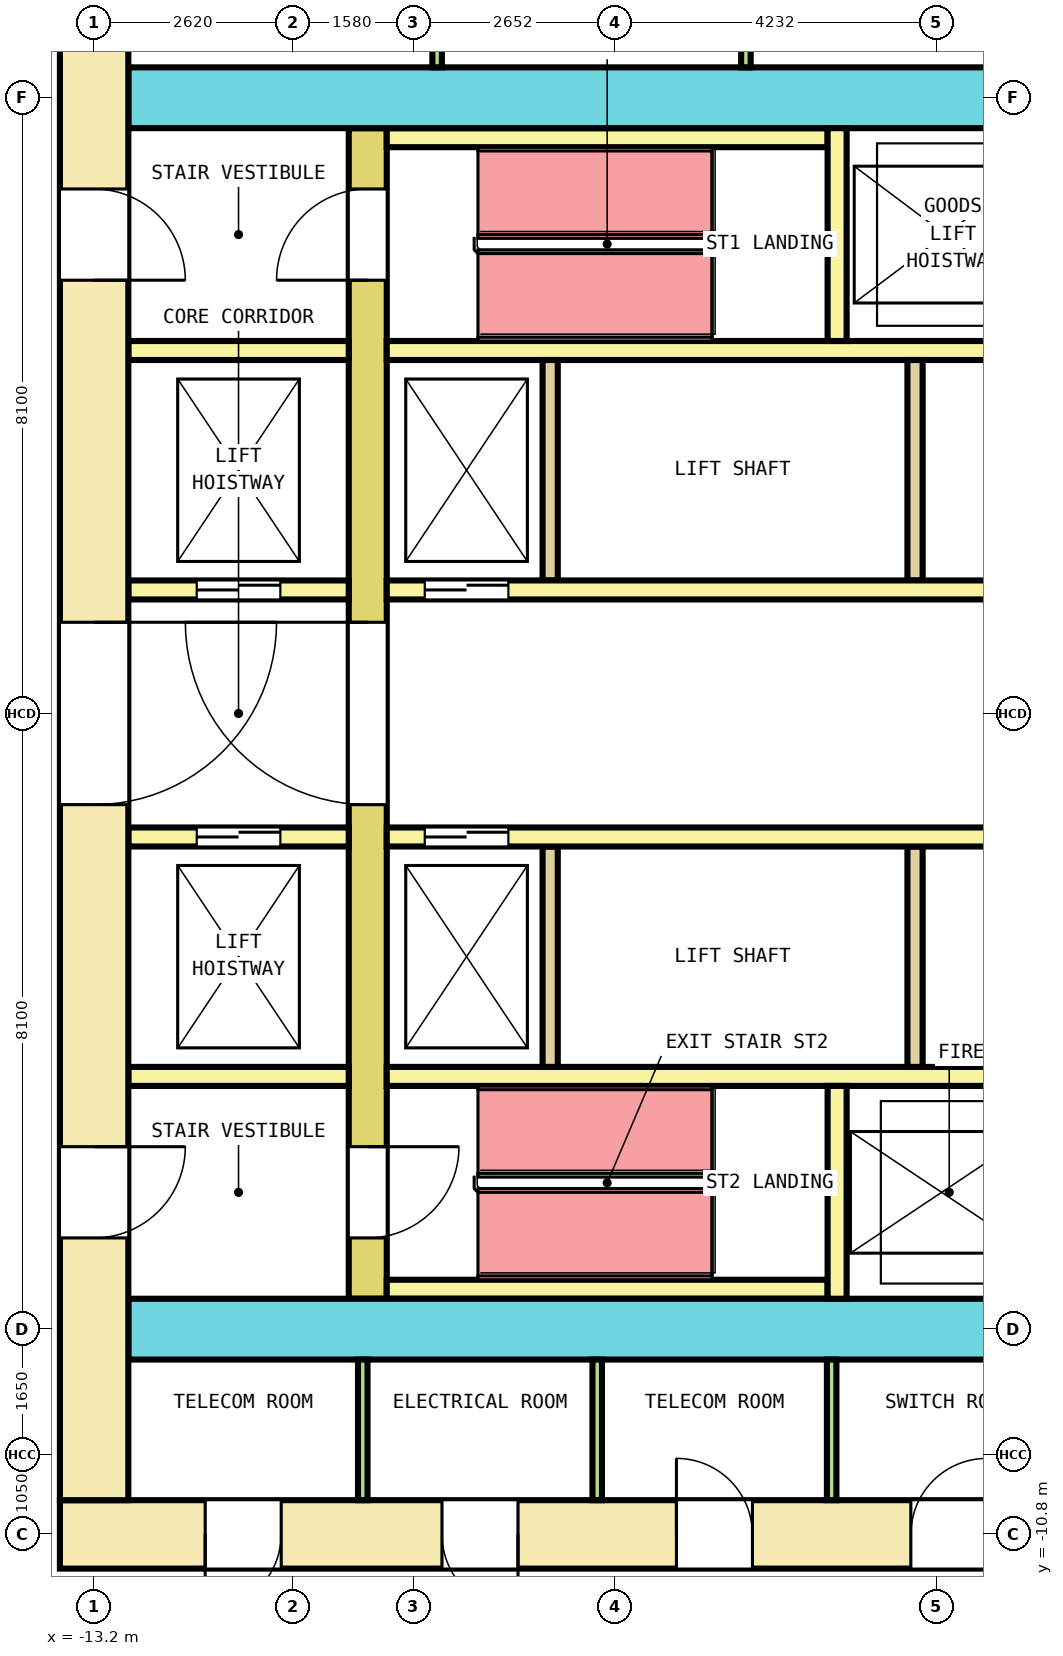
"""IFC4 building model, lengths in metres.
Left out: names, types, materials, properties, quantities, classifications, styles, units other than length and angle.
Written with IfcOpenShell. Run it as: python <this file> out.ifc"""

import sys

from ifc_helpers import new_model, si_unit, direction, frame, frame_2d, origin, place, context, subcontext, project, spatial, rectangle, extrude, element, fill, save


model = new_model("IFC4")
c1 = context("Model", 3, precision=1e-05, world=origin(), true_north=direction((0.0, 1.0)))
c2 = subcontext(c1, "Body", "Model", "MODEL_VIEW")
j1 = project(units=[si_unit("LENGTHUNIT", "METRE"), si_unit("PLANEANGLEUNIT", "RADIAN")], contexts=[c1])
p1 = place(None, origin())
s1 = spatial("IfcSite", under=j1, at=p1, CompositionType="ELEMENT")
p2 = place(p1, origin())
s2 = spatial("IfcBuilding", under=s1, at=p2, CompositionType="ELEMENT")
p3 = place(p2, frame((0.0, 0.0, 41.0)))
s3 = spatial("IfcBuildingStorey", under=s2, at=p3, CompositionType="ELEMENT", Elevation=41.0)
p4 = place(p3, frame((-13.65, -10.8, 0.0), z_axis=(0.0, 0.0, 1.0), x_axis=(1.0, 0.0, 0.0)))
e1 = element("IfcWall", 1, at=p4, inside=s3, PredefinedType="SHEAR", context=c2, shape_type="SweptSolid", body=[
    extrude(rectangle(XDim=27.3, YDim=0.9, at=frame_2d((13.65, 0.0))), origin(), (0.0, 0.0, 1.0), 4.1),
])
p5 = place(p4, frame((1.911, 0.0, 0.0)))
e2 = element("IfcOpeningElement", 2, at=p5, cuts=e1, PredefinedType="OPENING", context=c2, shape_type="SweptSolid", body=[
    extrude(rectangle(XDim=1.0, YDim=2.1, at=frame_2d((0.5, 1.05))), frame((0.0, 0.46, 0.0), z_axis=(0.0, -1.0, 0.0), x_axis=(1.0, 0.0, 0.0)), (0.0, 0.0, 1.0), 0.92),
])
p6 = place(p4, frame((5.027, 0.0, 0.0)))
e3 = element("IfcOpeningElement", 3, at=p6, cuts=e1, PredefinedType="OPENING", context=c2, shape_type="SweptSolid", body=[
    extrude(rectangle(XDim=1.0, YDim=2.1, at=frame_2d((0.5, 1.05))), frame((0.0, 0.46, 0.0), z_axis=(0.0, -1.0, 0.0), x_axis=(1.0, 0.0, 0.0)), (0.0, 0.0, 1.0), 0.92),
])
p7 = place(p4, frame((8.111, 0.0, 0.0)))
e4 = element("IfcOpeningElement", 4, at=p7, cuts=e1, PredefinedType="OPENING", context=c2, shape_type="SweptSolid", body=[
    extrude(rectangle(XDim=1.0, YDim=2.1, at=frame_2d((0.5, 1.05))), frame((0.0, 0.46, 0.0), z_axis=(0.0, -1.0, 0.0), x_axis=(1.0, 0.0, 0.0)), (0.0, 0.0, 1.0), 0.92),
])
p8 = place(p4, frame((11.195, 0.0, 0.0)))
e5 = element("IfcOpeningElement", 5, at=p8, cuts=e1, PredefinedType="OPENING", context=c2, shape_type="SweptSolid", body=[
    extrude(rectangle(XDim=1.0, YDim=2.1, at=frame_2d((0.5, 1.05))), frame((0.0, 0.46, 0.0), z_axis=(0.0, -1.0, 0.0), x_axis=(1.0, 0.0, 0.0)), (0.0, 0.0, 1.0), 0.92),
])
p9 = place(p4, frame((21.913, 0.0, 0.0)))
e6 = element("IfcOpeningElement", 6, at=p9, cuts=e1, PredefinedType="OPENING", context=c2, shape_type="SweptSolid", body=[
    extrude(rectangle(XDim=1.0, YDim=2.1, at=frame_2d((0.5, 1.05))), frame((0.0, 0.46, 0.0), z_axis=(0.0, -1.0, 0.0), x_axis=(1.0, 0.0, 0.0)), (0.0, 0.0, 1.0), 0.92),
])
p10 = place(p4, frame((15.2, 0.0, 0.0)))
e7 = element("IfcOpeningElement", 7, at=p10, cuts=e1, PredefinedType="OPENING", context=c2, shape_type="SweptSolid", body=[
    extrude(rectangle(XDim=1.2, YDim=2.1, at=frame_2d((0.6, 1.05))), frame((0.0, 0.46, 0.0), z_axis=(0.0, -1.0, 0.0), x_axis=(1.0, 0.0, 0.0)), (0.0, 0.0, 1.0), 0.92),
])
p11 = place(p3, frame((-13.2, -10.35, 0.0), z_axis=(0.0, 0.0, 1.0), x_axis=(0.0, 1.0, 0.0)))
e8 = element("IfcWall", 8, at=p11, inside=s3, PredefinedType="SHEAR", context=c2, shape_type="SweptSolid", body=[
    extrude(rectangle(XDim=20.7, YDim=0.9, at=frame_2d((10.35, 0.0))), origin(), (0.0, 0.0, 1.0), 4.1),
])
p12 = place(p11, frame((9.15, 0.0, 0.0)))
e9 = element("IfcOpeningElement", 9, at=p12, cuts=e8, PredefinedType="OPENING", context=c2, shape_type="SweptSolid", body=[
    extrude(rectangle(XDim=2.4, YDim=2.1, at=frame_2d((1.2, 1.05))), frame((0.0, 0.46, 0.0), z_axis=(0.0, -1.0, 0.0), x_axis=(1.0, 0.0, 0.0)), (0.0, 0.0, 1.0), 0.92),
])
p13 = place(p11, frame((16.05, 0.0, 0.0)))
e10 = element("IfcOpeningElement", 10, at=p13, cuts=e8, PredefinedType="OPENING", context=c2, shape_type="SweptSolid", body=[
    extrude(rectangle(XDim=1.2, YDim=2.1, at=frame_2d((0.6, 1.05))), frame((0.0, 0.46, 0.0), z_axis=(0.0, -1.0, 0.0), x_axis=(1.0, 0.0, 0.0)), (0.0, 0.0, 1.0), 0.92),
])
p14 = place(p11, frame((3.45, 0.0, 0.0)))
e11 = element("IfcOpeningElement", 11, at=p14, cuts=e8, PredefinedType="OPENING", context=c2, shape_type="SweptSolid", body=[
    extrude(rectangle(XDim=1.2, YDim=2.1, at=frame_2d((0.6, 1.05))), frame((0.0, 0.46, 0.0), z_axis=(0.0, -1.0, 0.0), x_axis=(1.0, 0.0, 0.0)), (0.0, 0.0, 1.0), 0.92),
])
p15 = place(p3, frame((-12.75, 8.1, 0.0), z_axis=(0.0, 0.0, 1.0), x_axis=(1.0, 0.0, 0.0)))
e12 = element("IfcWall", 12, at=p15, inside=s3, PredefinedType="SHEAR", context=c2, shape_type="SweptSolid", body=[
    extrude(rectangle(XDim=25.5, YDim=0.8, at=frame_2d((12.75, 0.0))), origin(), (0.0, 0.0, 1.0), 4.1),
])
p16 = place(p15, frame((13.675, 0.0, 0.0)))
e13 = element("IfcOpeningElement", 13, at=p16, cuts=e12, PredefinedType="OPENING", context=c2, shape_type="SweptSolid", body=[
    extrude(rectangle(XDim=1.4, YDim=2.1, at=frame_2d((0.7, 1.05))), frame((0.0, 0.41, 0.0), z_axis=(0.0, -1.0, 0.0), x_axis=(1.0, 0.0, 0.0)), (0.0, 0.0, 1.0), 0.82),
])
p17 = place(p3, frame((-12.75, -8.1, 0.0), z_axis=(0.0, 0.0, 1.0), x_axis=(1.0, 0.0, 0.0)))
e14 = element("IfcWall", 14, at=p17, inside=s3, PredefinedType="SHEAR", context=c2, shape_type="SweptSolid", body=[
    extrude(rectangle(XDim=25.5, YDim=0.8, at=frame_2d((12.75, 0.0))), origin(), (0.0, 0.0, 1.0), 4.1),
])
p18 = place(p17, frame((14.3, 0.0, 0.0)))
e15 = element("IfcOpeningElement", 15, at=p18, cuts=e14, PredefinedType="OPENING", context=c2, shape_type="SweptSolid", body=[
    extrude(rectangle(XDim=1.2, YDim=2.1, at=frame_2d((0.6, 1.05))), frame((0.0, 0.41, 0.0), z_axis=(0.0, -1.0, 0.0), x_axis=(1.0, 0.0, 0.0)), (0.0, 0.0, 1.0), 0.82),
])
p19 = place(p3, frame((-9.6, -7.7, 0.0), z_axis=(0.0, 0.0, 1.0), x_axis=(0.0, 1.0, 0.0)))
e16 = element("IfcWall", 16, at=p19, inside=s3, PredefinedType="SHEAR", context=c2, shape_type="SweptSolid", body=[
    extrude(rectangle(XDim=15.4, YDim=0.5, at=frame_2d((7.7, 0.0))), origin(), (0.0, 0.0, 1.0), 4.1),
])
p20 = place(p19, frame((6.5, 0.0, 0.0)))
e17 = element("IfcOpeningElement", 17, at=p20, cuts=e16, PredefinedType="OPENING", context=c2, shape_type="SweptSolid", body=[
    extrude(rectangle(XDim=2.4, YDim=2.1, at=frame_2d((1.2, 1.05))), frame((0.0, 0.26, 0.0), z_axis=(0.0, -1.0, 0.0), x_axis=(1.0, 0.0, 0.0)), (0.0, 0.0, 1.0), 0.52),
])
p21 = place(p19, frame((13.4, 0.0, 0.0)))
e18 = element("IfcOpeningElement", 18, at=p21, cuts=e16, PredefinedType="OPENING", context=c2, shape_type="SweptSolid", body=[
    extrude(rectangle(XDim=1.2, YDim=2.1, at=frame_2d((0.6, 1.05))), frame((0.0, 0.26, 0.0), z_axis=(0.0, -1.0, 0.0), x_axis=(1.0, 0.0, 0.0)), (0.0, 0.0, 1.0), 0.52),
])
p22 = place(p19, frame((0.8, 0.0, 0.0)))
e19 = element("IfcOpeningElement", 19, at=p22, cuts=e16, PredefinedType="OPENING", context=c2, shape_type="SweptSolid", body=[
    extrude(rectangle(XDim=1.2, YDim=2.1, at=frame_2d((0.6, 1.05))), frame((0.0, 0.26, 0.0), z_axis=(0.0, -1.0, 0.0), x_axis=(1.0, 0.0, 0.0)), (0.0, 0.0, 1.0), 0.52),
])
p23 = place(p3, frame((-12.75, 1.625, 0.0), z_axis=(0.0, 0.0, 1.0), x_axis=(1.0, 0.0, 0.0)))
e20 = element("IfcWall", 20, at=p23, inside=s3, PredefinedType="SOLIDWALL", context=c2, shape_type="SweptSolid", body=[
    extrude(rectangle(XDim=2.9, YDim=0.25, at=frame_2d((1.45, 0.0))), origin(), (0.0, 0.0, 1.0), 4.1),
])
p24 = place(p23, frame((0.9, 0.0, 0.0)))
e21 = element("IfcOpeningElement", 21, at=p24, cuts=e20, PredefinedType="OPENING", context=c2, shape_type="SweptSolid", body=[
    extrude(rectangle(XDim=1.1, YDim=2.1, at=frame_2d((0.55, 1.05))), frame((0.0, 0.135, 0.0), z_axis=(0.0, -1.0, 0.0), x_axis=(1.0, 0.0, 0.0)), (0.0, 0.0, 1.0), 0.27),
])
p25 = place(p3, frame((-9.35, 1.625, 0.0), z_axis=(0.0, 0.0, 1.0), x_axis=(1.0, 0.0, 0.0)))
e22 = element("IfcWall", 22, at=p25, inside=s3, PredefinedType="SOLIDWALL", context=c2, shape_type="SweptSolid", body=[
    extrude(rectangle(XDim=18.7, YDim=0.25, at=frame_2d((9.35, 0.0))), origin(), (0.0, 0.0, 1.0), 4.1),
])
p26 = place(p25, frame((0.5, 0.0, 0.0)))
e23 = element("IfcOpeningElement", 23, at=p26, cuts=e22, PredefinedType="OPENING", context=c2, shape_type="SweptSolid", body=[
    extrude(rectangle(XDim=1.1, YDim=2.1, at=frame_2d((0.55, 1.05))), frame((0.0, 0.135, 0.0), z_axis=(0.0, -1.0, 0.0), x_axis=(1.0, 0.0, 0.0)), (0.0, 0.0, 1.0), 0.27),
])
p27 = place(p25, frame((17.1, 0.0, 0.0)))
e24 = element("IfcOpeningElement", 24, at=p27, cuts=e22, PredefinedType="OPENING", context=c2, shape_type="SweptSolid", body=[
    extrude(rectangle(XDim=1.1, YDim=2.1, at=frame_2d((0.55, 1.05))), frame((0.0, 0.135, 0.0), z_axis=(0.0, -1.0, 0.0), x_axis=(1.0, 0.0, 0.0)), (0.0, 0.0, 1.0), 0.27),
])
p28 = place(p3, frame((-12.75, 4.775, 0.0), z_axis=(0.0, 0.0, 1.0), x_axis=(1.0, 0.0, 0.0)))
e25 = element("IfcWall", 25, at=p28, inside=s3, PredefinedType="SOLIDWALL", context=c2, shape_type="SweptSolid", body=[
    extrude(rectangle(XDim=2.9, YDim=0.25, at=frame_2d((1.45, 0.0))), origin(), (0.0, 0.0, 1.0), 4.1),
])
p29 = place(p3, frame((-9.35, 4.775, 0.0), z_axis=(0.0, 0.0, 1.0), x_axis=(1.0, 0.0, 0.0)))
e26 = element("IfcWall", 26, at=p29, inside=s3, PredefinedType="SOLIDWALL", context=c2, shape_type="SweptSolid", body=[
    extrude(rectangle(XDim=18.7, YDim=0.25, at=frame_2d((9.35, 0.0))), origin(), (0.0, 0.0, 1.0), 4.1),
])
for number, where, z_axis, x_axis in (
    (27, (-7.2, 1.75, 0.0), (0.0, 0.0, 1.0), (0.0, 1.0, 0.0)),
    (28, (-2.4, 1.75, 0.0), (0.0, 0.0, 1.0), (0.0, 1.0, 0.0)),
):
    element("IfcWall", number, at=place(p3, frame(where, z_axis=z_axis, x_axis=x_axis)), inside=s3, PredefinedType="SOLIDWALL", context=c2, shape_type="SweptSolid", body=[
        extrude(rectangle(XDim=2.9, YDim=0.2, at=frame_2d((1.45, 0.0))), origin(), (0.0, 0.0, 1.0), 4.1),
    ])
p30 = place(p3, frame((-12.75, -1.625, 0.0), z_axis=(0.0, 0.0, 1.0), x_axis=(1.0, 0.0, 0.0)))
e29 = element("IfcWall", 29, at=p30, inside=s3, PredefinedType="SOLIDWALL", context=c2, shape_type="SweptSolid", body=[
    extrude(rectangle(XDim=2.9, YDim=0.25, at=frame_2d((1.45, 0.0))), origin(), (0.0, 0.0, 1.0), 4.1),
])
p31 = place(p30, frame((0.9, 0.0, 0.0)))
e30 = element("IfcOpeningElement", 30, at=p31, cuts=e29, PredefinedType="OPENING", context=c2, shape_type="SweptSolid", body=[
    extrude(rectangle(XDim=1.1, YDim=2.1, at=frame_2d((0.55, 1.05))), frame((0.0, 0.135, 0.0), z_axis=(0.0, -1.0, 0.0), x_axis=(1.0, 0.0, 0.0)), (0.0, 0.0, 1.0), 0.27),
])
p32 = place(p3, frame((-9.35, -1.625, 0.0), z_axis=(0.0, 0.0, 1.0), x_axis=(1.0, 0.0, 0.0)))
e31 = element("IfcWall", 31, at=p32, inside=s3, PredefinedType="SOLIDWALL", context=c2, shape_type="SweptSolid", body=[
    extrude(rectangle(XDim=18.7, YDim=0.25, at=frame_2d((9.35, 0.0))), origin(), (0.0, 0.0, 1.0), 4.1),
])
p33 = place(p32, frame((0.5, 0.0, 0.0)))
e32 = element("IfcOpeningElement", 32, at=p33, cuts=e31, PredefinedType="OPENING", context=c2, shape_type="SweptSolid", body=[
    extrude(rectangle(XDim=1.1, YDim=2.1, at=frame_2d((0.55, 1.05))), frame((0.0, 0.135, 0.0), z_axis=(0.0, -1.0, 0.0), x_axis=(1.0, 0.0, 0.0)), (0.0, 0.0, 1.0), 0.27),
])
p34 = place(p32, frame((17.1, 0.0, 0.0)))
e33 = element("IfcOpeningElement", 33, at=p34, cuts=e31, PredefinedType="OPENING", context=c2, shape_type="SweptSolid", body=[
    extrude(rectangle(XDim=1.1, YDim=2.1, at=frame_2d((0.55, 1.05))), frame((0.0, 0.135, 0.0), z_axis=(0.0, -1.0, 0.0), x_axis=(1.0, 0.0, 0.0)), (0.0, 0.0, 1.0), 0.27),
])
p35 = place(p3, frame((-12.75, -4.775, 0.0), z_axis=(0.0, 0.0, 1.0), x_axis=(1.0, 0.0, 0.0)))
e34 = element("IfcWall", 34, at=p35, inside=s3, PredefinedType="SOLIDWALL", context=c2, shape_type="SweptSolid", body=[
    extrude(rectangle(XDim=2.9, YDim=0.25, at=frame_2d((1.45, 0.0))), origin(), (0.0, 0.0, 1.0), 4.1),
])
p36 = place(p3, frame((-9.35, -4.775, 0.0), z_axis=(0.0, 0.0, 1.0), x_axis=(1.0, 0.0, 0.0)))
e35 = element("IfcWall", 35, at=p36, inside=s3, PredefinedType="SOLIDWALL", context=c2, shape_type="SweptSolid", body=[
    extrude(rectangle(XDim=18.7, YDim=0.25, at=frame_2d((9.35, 0.0))), origin(), (0.0, 0.0, 1.0), 4.1),
])
for number, where, z_axis, x_axis in (
    (36, (-7.2, -4.65, 0.0), (0.0, 0.0, 1.0), (0.0, 1.0, 0.0)),
    (37, (-2.4, -4.65, 0.0), (0.0, 0.0, 1.0), (0.0, 1.0, 0.0)),
):
    element("IfcWall", number, at=place(p3, frame(where, z_axis=z_axis, x_axis=x_axis)), inside=s3, PredefinedType="SOLIDWALL", context=c2, shape_type="SweptSolid", body=[
        extrude(rectangle(XDim=2.9, YDim=0.2, at=frame_2d((1.45, 0.0))), origin(), (0.0, 0.0, 1.0), 4.1),
    ])
p37 = place(p3, frame((-9.35, 7.575, 0.0), z_axis=(0.0, 0.0, 1.0), x_axis=(1.0, 0.0, 0.0)))
e38 = element("IfcWall", 38, at=p37, inside=s3, PredefinedType="SOLIDWALL", context=c2, shape_type="SweptSolid", body=[
    extrude(rectangle(XDim=5.8, YDim=0.25, at=frame_2d((2.9, 0.0))), origin(), (0.0, 0.0, 1.0), 4.1),
])
p38 = place(p3, frame((-3.425, 4.9, 0.0), z_axis=(0.0, 0.0, 1.0), x_axis=(0.0, 1.0, 0.0)))
e39 = element("IfcWall", 39, at=p38, inside=s3, PredefinedType="SOLIDWALL", context=c2, shape_type="SweptSolid", body=[
    extrude(rectangle(XDim=2.8, YDim=0.25, at=frame_2d((1.4, 0.0))), origin(), (0.0, 0.0, 1.0), 4.1),
])
p39 = place(p3, frame((-9.35, -7.575, 0.0), z_axis=(0.0, 0.0, 1.0), x_axis=(1.0, 0.0, 0.0)))
e40 = element("IfcWall", 40, at=p39, inside=s3, PredefinedType="SOLIDWALL", context=c2, shape_type="SweptSolid", body=[
    extrude(rectangle(XDim=5.8, YDim=0.25, at=frame_2d((2.9, 0.0))), origin(), (0.0, 0.0, 1.0), 4.1),
])
p40 = place(p3, frame((-3.425, -7.7, 0.0), z_axis=(0.0, 0.0, 1.0), x_axis=(0.0, 1.0, 0.0)))
e41 = element("IfcWall", 41, at=p40, inside=s3, PredefinedType="SOLIDWALL", context=c2, shape_type="SweptSolid", body=[
    extrude(rectangle(XDim=2.8, YDim=0.25, at=frame_2d((1.4, 0.0))), origin(), (0.0, 0.0, 1.0), 4.1),
])
for number, where, z_axis, x_axis in (
    (42, (-8.688, 8.5, 0.0), (0.0, 0.0, 1.0), (0.0, 1.0, 0.0)),
    (43, (-4.625, 8.5, 0.0), (0.0, 0.0, 1.0), (0.0, 1.0, 0.0)),
    (44, (-9.666, -10.35, 0.0), (0.0, 0.0, 1.0), (0.0, 1.0, 0.0)),
    (45, (-6.581, -10.35, 0.0), (0.0, 0.0, 1.0), (0.0, 1.0, 0.0)),
    (46, (-3.497, -10.35, 0.0), (0.0, 0.0, 1.0), (0.0, 1.0, 0.0)),
):
    element("IfcWall", number, at=place(p3, frame(where, z_axis=z_axis, x_axis=x_axis)), inside=s3, PredefinedType="PARTITIONING", context=c2, shape_type="SweptSolid", body=[
        extrude(rectangle(XDim=1.85, YDim=0.125, at=frame_2d((0.925, 0.0))), origin(), (0.0, 0.0, 1.0), 4.1),
    ])
p41 = place(p24, origin())
e47 = element("IfcDoor", 47, at=p41, inside=s3, OperationType="DOUBLE_DOOR_SLIDING", PredefinedType="DOOR", context=c2, shape_type="SweptSolid", body=[
    extrude(rectangle(XDim=1.1, YDim=2.1, at=frame_2d((0.55, 1.05))), frame((0.0, 0.075, 0.0), z_axis=(0.0, -1.0, 0.0), x_axis=(1.0, 0.0, 0.0)), (0.0, 0.0, 1.0), 0.15),
])
fill(e21, e47)
p42 = place(p26, origin())
e48 = element("IfcDoor", 48, at=p42, inside=s3, OperationType="DOUBLE_DOOR_SLIDING", PredefinedType="DOOR", context=c2, shape_type="SweptSolid", body=[
    extrude(rectangle(XDim=1.1, YDim=2.1, at=frame_2d((0.55, 1.05))), frame((0.0, 0.075, 0.0), z_axis=(0.0, -1.0, 0.0), x_axis=(1.0, 0.0, 0.0)), (0.0, 0.0, 1.0), 0.15),
])
fill(e23, e48)
p43 = place(p31, origin())
e49 = element("IfcDoor", 49, at=p43, inside=s3, OperationType="DOUBLE_DOOR_SLIDING", PredefinedType="DOOR", context=c2, shape_type="SweptSolid", body=[
    extrude(rectangle(XDim=1.1, YDim=2.1, at=frame_2d((0.55, 1.05))), frame((0.0, 0.075, 0.0), z_axis=(0.0, -1.0, 0.0), x_axis=(1.0, 0.0, 0.0)), (0.0, 0.0, 1.0), 0.15),
])
fill(e30, e49)
p44 = place(p33, origin())
e50 = element("IfcDoor", 50, at=p44, inside=s3, OperationType="DOUBLE_DOOR_SLIDING", PredefinedType="DOOR", context=c2, shape_type="SweptSolid", body=[
    extrude(rectangle(XDim=1.1, YDim=2.1, at=frame_2d((0.55, 1.05))), frame((0.0, 0.075, 0.0), z_axis=(0.0, -1.0, 0.0), x_axis=(1.0, 0.0, 0.0)), (0.0, 0.0, 1.0), 0.15),
])
fill(e32, e50)
p45 = place(p20, origin())
e51 = element("IfcDoor", 51, at=p45, inside=s3, OperationType="DOUBLE_DOOR_SINGLE_SWING", PredefinedType="DOOR", context=c2, shape_type="SweptSolid", body=[
    extrude(rectangle(XDim=2.4, YDim=2.1, at=frame_2d((1.2, 1.05))), frame((0.0, 0.2, 0.0), z_axis=(0.0, -1.0, 0.0), x_axis=(1.0, 0.0, 0.0)), (0.0, 0.0, 1.0), 0.4),
])
fill(e17, e51)
p46 = place(p12, origin())
e52 = element("IfcDoor", 52, at=p46, inside=s3, OperationType="DOUBLE_DOOR_SINGLE_SWING", PredefinedType="DOOR", context=c2, shape_type="SweptSolid", body=[
    extrude(rectangle(XDim=2.4, YDim=2.1, at=frame_2d((1.2, 1.05))), frame((0.0, 0.3, 0.0), z_axis=(0.0, -1.0, 0.0), x_axis=(1.0, 0.0, 0.0)), (0.0, 0.0, 1.0), 0.6),
])
fill(e9, e52)
p47 = place(p21, origin())
e53 = element("IfcDoor", 53, at=p47, inside=s3, OperationType="SINGLE_SWING_RIGHT", PredefinedType="DOOR", context=c2, shape_type="SweptSolid", body=[
    extrude(rectangle(XDim=1.2, YDim=2.1, at=frame_2d((0.6, 1.05))), frame((0.0, 0.2, 0.0), z_axis=(0.0, -1.0, 0.0), x_axis=(1.0, 0.0, 0.0)), (0.0, 0.0, 1.0), 0.4),
])
fill(e18, e53)
p48 = place(p13, origin())
e54 = element("IfcDoor", 54, at=p48, inside=s3, OperationType="SINGLE_SWING_LEFT", PredefinedType="DOOR", context=c2, shape_type="SweptSolid", body=[
    extrude(rectangle(XDim=1.2, YDim=2.1, at=frame_2d((0.6, 1.05))), frame((0.0, 0.3, 0.0), z_axis=(0.0, -1.0, 0.0), x_axis=(1.0, 0.0, 0.0)), (0.0, 0.0, 1.0), 0.6),
])
fill(e10, e54)
p49 = place(p22, origin())
e55 = element("IfcDoor", 55, at=p49, inside=s3, OperationType="SINGLE_SWING_RIGHT", PredefinedType="DOOR", context=c2, shape_type="SweptSolid", body=[
    extrude(rectangle(XDim=1.2, YDim=2.1, at=frame_2d((0.6, 1.05))), frame((0.0, 0.2, 0.0), z_axis=(0.0, -1.0, 0.0), x_axis=(1.0, 0.0, 0.0)), (0.0, 0.0, 1.0), 0.4),
])
fill(e19, e55)
p50 = place(p14, origin())
e56 = element("IfcDoor", 56, at=p50, inside=s3, OperationType="SINGLE_SWING_LEFT", PredefinedType="DOOR", context=c2, shape_type="SweptSolid", body=[
    extrude(rectangle(XDim=1.2, YDim=2.1, at=frame_2d((0.6, 1.05))), frame((0.0, 0.3, 0.0), z_axis=(0.0, -1.0, 0.0), x_axis=(1.0, 0.0, 0.0)), (0.0, 0.0, 1.0), 0.6),
])
fill(e11, e56)
p51 = place(p5, origin())
e57 = element("IfcDoor", 57, at=p51, inside=s3, OperationType="SINGLE_SWING_LEFT", PredefinedType="DOOR", context=c2, shape_type="SweptSolid", body=[
    extrude(rectangle(XDim=1.0, YDim=2.1, at=frame_2d((0.5, 1.05))), frame((0.0, 0.3, 0.0), z_axis=(0.0, -1.0, 0.0), x_axis=(1.0, 0.0, 0.0)), (0.0, 0.0, 1.0), 0.6),
])
fill(e2, e57)
p52 = place(p6, origin())
e58 = element("IfcDoor", 58, at=p52, inside=s3, OperationType="SINGLE_SWING_RIGHT", PredefinedType="DOOR", context=c2, shape_type="SweptSolid", body=[
    extrude(rectangle(XDim=1.0, YDim=2.1, at=frame_2d((0.5, 1.05))), frame((0.0, 0.3, 0.0), z_axis=(0.0, -1.0, 0.0), x_axis=(1.0, 0.0, 0.0)), (0.0, 0.0, 1.0), 0.6),
])
fill(e3, e58)
p53 = place(p7, origin())
e59 = element("IfcDoor", 59, at=p53, inside=s3, OperationType="SINGLE_SWING_LEFT", PredefinedType="DOOR", context=c2, shape_type="SweptSolid", body=[
    extrude(rectangle(XDim=1.0, YDim=2.1, at=frame_2d((0.5, 1.05))), frame((0.0, 0.3, 0.0), z_axis=(0.0, -1.0, 0.0), x_axis=(1.0, 0.0, 0.0)), (0.0, 0.0, 1.0), 0.6),
])
fill(e4, e59)
p54 = place(p8, origin())
e60 = element("IfcDoor", 60, at=p54, inside=s3, OperationType="SINGLE_SWING_RIGHT", PredefinedType="DOOR", context=c2, shape_type="SweptSolid", body=[
    extrude(rectangle(XDim=1.0, YDim=2.1, at=frame_2d((0.5, 1.05))), frame((0.0, 0.3, 0.0), z_axis=(0.0, -1.0, 0.0), x_axis=(1.0, 0.0, 0.0)), (0.0, 0.0, 1.0), 0.6),
])
fill(e5, e60)
save(model, sys.argv[1])
